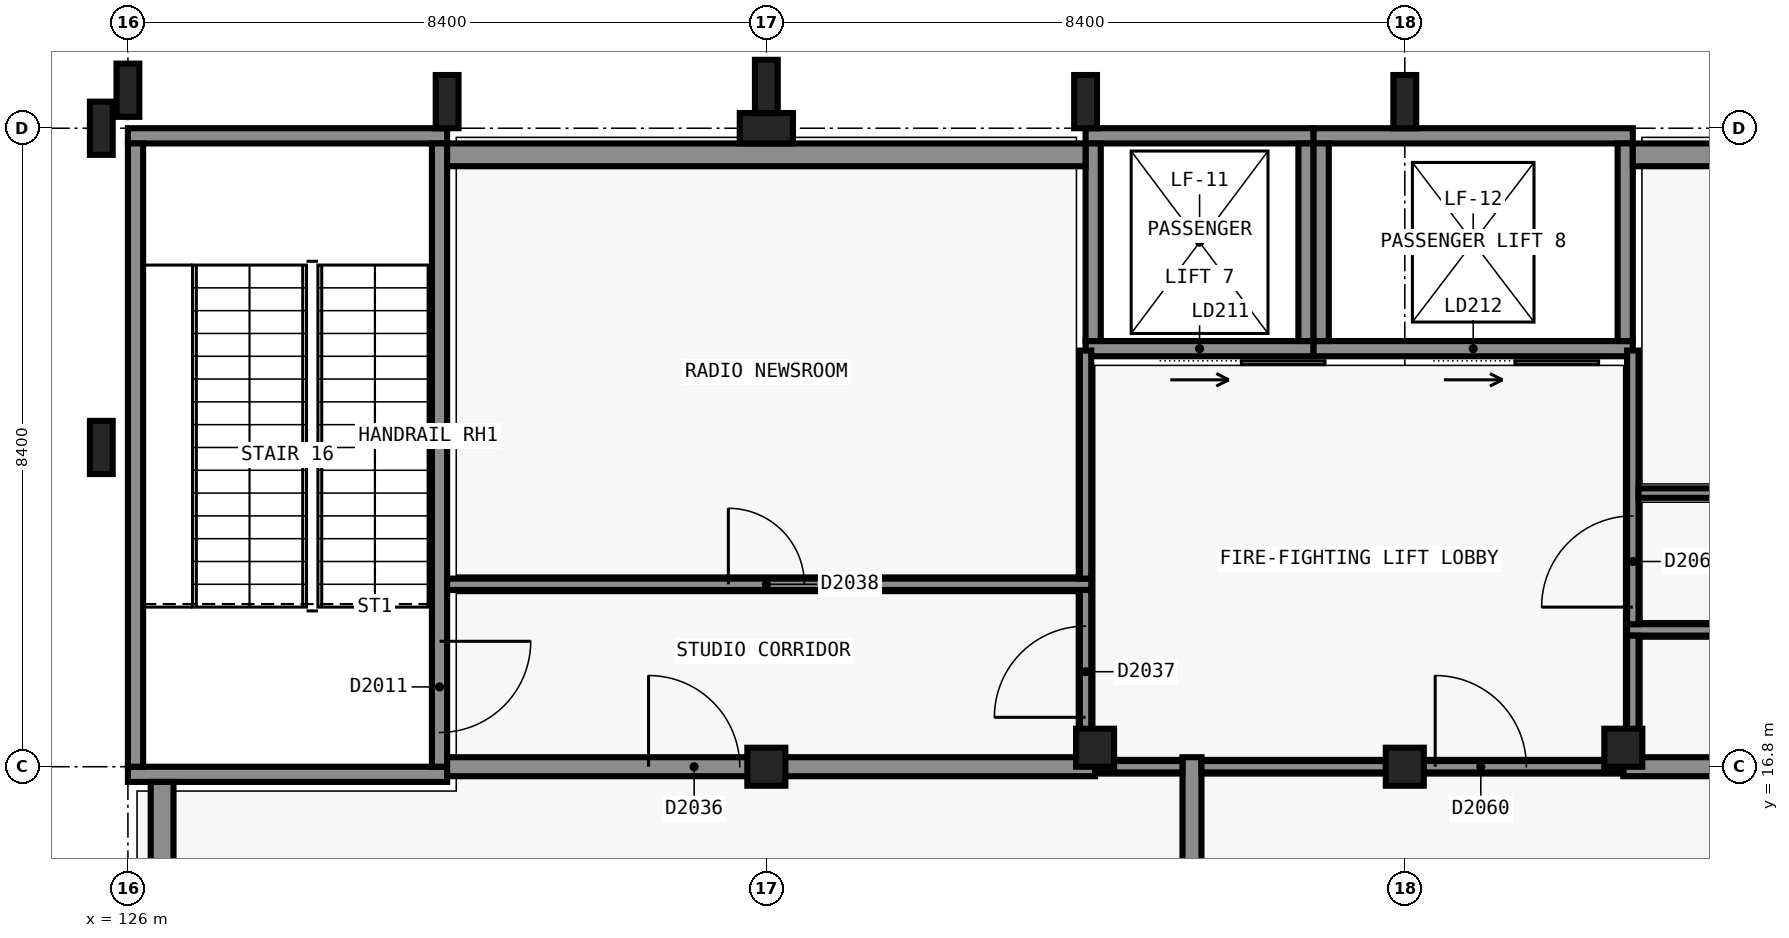
"""IFC4 building model, lengths in metres.
Left out: names, types, materials, properties, quantities, classifications, styles, units other than length and angle.
Written with IfcOpenShell. Run it as: python <this file> out.ifc"""

import sys

from ifc_helpers import new_model, si_unit, direction, frame, frame_2d, origin, origin_2d, place, context, subcontext, project, spatial, rectangle, extrude, element, fill, save


model = new_model("IFC4")
c1 = context("Model", 3, precision=1e-05, world=origin(), true_north=direction((0.0, 1.0)))
c2 = subcontext(c1, "Body", "Model", "MODEL_VIEW")
j1 = project(units=[si_unit("LENGTHUNIT", "METRE"), si_unit("PLANEANGLEUNIT", "RADIAN")], contexts=[c1])
p1 = place(None, origin())
s1 = spatial("IfcSite", under=j1, at=p1, CompositionType="ELEMENT")
p2 = place(p1, origin())
s2 = spatial("IfcBuilding", under=s1, at=p2, CompositionType="ELEMENT")
p3 = place(p2, frame((0.0, 0.0, 10.2)))
s3 = spatial("IfcBuildingStorey", under=s2, at=p3, CompositionType="ELEMENT", Elevation=10.2)
for number, where, z_axis, x_axis in (
    (1, (130.2, 16.7, 0.0), (0.0, 0.0, 1.0), (-1.0, 0.0, 0.0)),
    (2, (126.0, 25.1, 0.0), (0.0, 0.0, 1.0), (1.0, 0.0, 0.0)),
):
    element("IfcWall", number, at=place(p3, frame(where, z_axis=z_axis, x_axis=x_axis)), inside=s3, PredefinedType="SHEAR", context=c2, shape_type="SweptSolid", body=[
        extrude(rectangle(XDim=4.2, YDim=0.2, at=frame_2d((2.1, 0.0))), origin(), (0.0, 0.0, 1.0), 4.8),
    ])
p4 = place(p3, frame((126.1, 16.8, 0.0), z_axis=(0.0, 0.0, 1.0), x_axis=(0.0, 1.0, 0.0)))
e3 = element("IfcWall", 3, at=p4, inside=s3, PredefinedType="SHEAR", context=c2, shape_type="SweptSolid", body=[
    extrude(rectangle(XDim=8.2, YDim=0.2, at=frame_2d((4.1, 0.0))), origin(), (0.0, 0.0, 1.0), 4.8),
])
p5 = place(p3, frame((130.1, 25.0, 0.0), z_axis=(0.0, 0.0, 1.0), x_axis=(0.0, -1.0, 0.0)))
e4 = element("IfcWall", 4, at=p5, inside=s3, PredefinedType="SHEAR", context=c2, shape_type="SweptSolid", body=[
    extrude(rectangle(XDim=8.2, YDim=0.2, at=frame_2d((4.1, 0.0))), origin(), (0.0, 0.0, 1.0), 4.8),
])
p6 = place(p5, frame((6.55, 0.0, 0.0)))
e5 = element("IfcOpeningElement", 5, at=p6, cuts=e4, PredefinedType="OPENING", context=c2, shape_type="SweptSolid", body=[
    extrude(rectangle(XDim=1.2, YDim=2.1, at=frame_2d((0.6, 1.05))), frame((0.0, 0.11, 0.0), z_axis=(0.0, -1.0, 0.0), x_axis=(1.0, 0.0, 0.0)), (0.0, 0.0, 1.0), 0.22),
])
p7 = place(p3, frame((141.6, 22.3, 0.0), z_axis=(0.0, 0.0, 1.0), x_axis=(-1.0, 0.0, 0.0)))
e6 = element("IfcWall", 6, at=p7, inside=s3, PredefinedType="SHEAR", context=c2, shape_type="SweptSolid", body=[
    extrude(rectangle(XDim=3.0, YDim=0.2, at=frame_2d((1.5, 0.0))), origin(), (0.0, 0.0, 1.0), 4.8),
])
p8 = place(p7, frame((0.95, 0.0, 0.0)))
e7 = element("IfcOpeningElement", 7, at=p8, cuts=e6, PredefinedType="OPENING", context=c2, shape_type="SweptSolid", body=[
    extrude(rectangle(XDim=1.1, YDim=2.1, at=frame_2d((0.55, 1.05))), frame((0.0, 0.11, 0.0), z_axis=(0.0, -1.0, 0.0), x_axis=(1.0, 0.0, 0.0)), (0.0, 0.0, 1.0), 0.22),
])
p9 = place(p3, frame((138.6, 25.1, 0.0), z_axis=(0.0, 0.0, 1.0), x_axis=(1.0, 0.0, 0.0)))
e8 = element("IfcWall", 8, at=p9, inside=s3, PredefinedType="SHEAR", context=c2, shape_type="SweptSolid", body=[
    extrude(rectangle(XDim=3.0, YDim=0.2, at=frame_2d((1.5, 0.0))), origin(), (0.0, 0.0, 1.0), 4.8),
])
for number, where, z_axis, x_axis in (
    (9, (138.7, 22.4, 0.0), (0.0, 0.0, 1.0), (0.0, 1.0, 0.0)),
    (10, (141.5, 25.0, 0.0), (0.0, 0.0, 1.0), (0.0, -1.0, 0.0)),
):
    element("IfcWall", number, at=place(p3, frame(where, z_axis=z_axis, x_axis=x_axis)), inside=s3, PredefinedType="SHEAR", context=c2, shape_type="SweptSolid", body=[
        extrude(rectangle(XDim=2.6, YDim=0.2, at=frame_2d((1.3, 0.0))), origin(), (0.0, 0.0, 1.0), 4.8),
    ])
p10 = place(p3, frame((145.8, 22.3, 0.0), z_axis=(0.0, 0.0, 1.0), x_axis=(-1.0, 0.0, 0.0)))
e11 = element("IfcWall", 11, at=p10, inside=s3, PredefinedType="SHEAR", context=c2, shape_type="SweptSolid", body=[
    extrude(rectangle(XDim=4.2, YDim=0.2, at=frame_2d((2.1, 0.0))), origin(), (0.0, 0.0, 1.0), 4.8),
])
p11 = place(p10, frame((1.55, 0.0, 0.0)))
e12 = element("IfcOpeningElement", 12, at=p11, cuts=e11, PredefinedType="OPENING", context=c2, shape_type="SweptSolid", body=[
    extrude(rectangle(XDim=1.1, YDim=2.1, at=frame_2d((0.55, 1.05))), frame((0.0, 0.11, 0.0), z_axis=(0.0, -1.0, 0.0), x_axis=(1.0, 0.0, 0.0)), (0.0, 0.0, 1.0), 0.22),
])
p12 = place(p3, frame((141.6, 25.1, 0.0), z_axis=(0.0, 0.0, 1.0), x_axis=(1.0, 0.0, 0.0)))
e13 = element("IfcWall", 13, at=p12, inside=s3, PredefinedType="SHEAR", context=c2, shape_type="SweptSolid", body=[
    extrude(rectangle(XDim=4.2, YDim=0.2, at=frame_2d((2.1, 0.0))), origin(), (0.0, 0.0, 1.0), 4.8),
])
for number, where, z_axis, x_axis in (
    (14, (141.7, 22.4, 0.0), (0.0, 0.0, 1.0), (0.0, 1.0, 0.0)),
    (15, (145.7, 25.0, 0.0), (0.0, 0.0, 1.0), (0.0, -1.0, 0.0)),
):
    element("IfcWall", number, at=place(p3, frame(where, z_axis=z_axis, x_axis=x_axis)), inside=s3, PredefinedType="SHEAR", context=c2, shape_type="SweptSolid", body=[
        extrude(rectangle(XDim=2.6, YDim=0.2, at=frame_2d((1.3, 0.0))), origin(), (0.0, 0.0, 1.0), 4.8),
    ])
p13 = place(p3, frame((134.4, 16.8, 0.0), z_axis=(0.0, 0.0, 1.0), x_axis=(1.0, 0.0, 0.0)))
e16 = element("IfcColumn", 16, at=p13, inside=s3, PredefinedType="COLUMN", context=c2, shape_type="SweptSolid", body=[
    extrude(rectangle(XDim=0.5, YDim=0.5, at=origin_2d()), origin(), (0.0, 0.0, 1.0), 4.8),
])
p14 = place(p3, frame((134.4, 25.2, 0.0), z_axis=(0.0, 0.0, 1.0), x_axis=(1.0, 0.0, 0.0)))
e17 = element("IfcColumn", 17, at=p14, inside=s3, PredefinedType="COLUMN", context=c2, shape_type="SweptSolid", body=[
    extrude(rectangle(XDim=0.7, YDim=0.4, at=origin_2d()), origin(), (0.0, 0.0, 1.0), 4.8),
])
for number, where, z_axis, x_axis in (
    (18, (142.8, 16.8, 0.0), (0.0, 0.0, 1.0), (1.0, 0.0, 0.0)),
    (19, (138.725, 17.05, 0.0), (0.0, 0.0, 1.0), (1.0, 0.0, 0.0)),
    (20, (145.675, 17.05, 0.0), (0.0, 0.0, 1.0), (1.0, 0.0, 0.0)),
):
    element("IfcColumn", number, at=place(p3, frame(where, z_axis=z_axis, x_axis=x_axis)), inside=s3, PredefinedType="COLUMN", context=c2, shape_type="SweptSolid", body=[
        extrude(rectangle(XDim=0.5, YDim=0.5, at=origin_2d()), origin(), (0.0, 0.0, 1.0), 4.8),
    ])
p15 = place(p3, frame((130.2, 24.85, 0.0), z_axis=(0.0, 0.0, 1.0), x_axis=(1.0, 0.0, 0.0)))
e21 = element("IfcWall", 21, at=p15, inside=s3, PredefinedType="SOLIDWALL", context=c2, shape_type="SweptSolid", body=[
    extrude(rectangle(XDim=8.4, YDim=0.3, at=frame_2d((4.2, 0.0))), origin(), (0.0, 0.0, 1.0), 4.5),
])
p16 = place(p3, frame((145.8, 24.85, 0.0), z_axis=(0.0, 0.0, 1.0), x_axis=(1.0, 0.0, 0.0)))
e22 = element("IfcWall", 22, at=p16, inside=s3, PredefinedType="SOLIDWALL", context=c2, shape_type="SweptSolid", body=[
    extrude(rectangle(XDim=18.0, YDim=0.3, at=frame_2d((9.0, 0.0))), origin(), (0.0, 0.0, 1.0), 4.5),
])
p17 = place(p16, frame((2.7, 0.0, 1.5)))
e23 = element("IfcOpeningElement", 23, at=p17, cuts=e22, PredefinedType="OPENING", context=c2, shape_type="SweptSolid", body=[
    extrude(rectangle(XDim=1.2, YDim=0.9, at=frame_2d((0.6, 0.45))), frame((0.0, 0.16, 0.0), z_axis=(0.0, -1.0, 0.0), x_axis=(1.0, 0.0, 0.0)), (0.0, 0.0, 1.0), 0.32),
])
p18 = place(p16, frame((6.9, 0.0, 1.5)))
e24 = element("IfcOpeningElement", 24, at=p18, cuts=e22, PredefinedType="OPENING", context=c2, shape_type="SweptSolid", body=[
    extrude(rectangle(XDim=1.2, YDim=0.9, at=frame_2d((0.6, 0.45))), frame((0.0, 0.16, 0.0), z_axis=(0.0, -1.0, 0.0), x_axis=(1.0, 0.0, 0.0)), (0.0, 0.0, 1.0), 0.32),
])
for number, where, z_axis, x_axis in (
    (25, (126.0, 25.7, 0.0), (0.0, 0.0, 1.0), (1.0, 0.0, 0.0)),
    (26, (130.2, 25.55, 0.0), (0.0, 0.0, 1.0), (1.0, 0.0, 0.0)),
    (27, (134.4, 25.75, 0.0), (0.0, 0.0, 1.0), (1.0, 0.0, 0.0)),
    (28, (138.6, 25.55, 0.0), (0.0, 0.0, 1.0), (1.0, 0.0, 0.0)),
    (29, (142.8, 25.55, 0.0), (0.0, 0.0, 1.0), (1.0, 0.0, 0.0)),
):
    element("IfcColumn", number, at=place(p3, frame(where, z_axis=z_axis, x_axis=x_axis)), inside=s3, PredefinedType="PILASTER", context=c2, shape_type="SweptSolid", body=[
        extrude(rectangle(XDim=0.3, YDim=0.7, at=origin_2d()), origin(), (0.0, 0.0, 1.0), 4.8),
    ])
p19 = place(p3, frame((126.45, 12.8, 0.0), z_axis=(0.0, 0.0, 1.0), x_axis=(0.0, 1.0, 0.0)))
e30 = element("IfcWall", 30, at=p19, inside=s3, PredefinedType="SOLIDWALL", context=c2, shape_type="SweptSolid", body=[
    extrude(rectangle(XDim=3.8, YDim=0.3, at=frame_2d((1.9, 0.0))), origin(), (0.0, 0.0, 1.0), 4.5),
])
for number, where, z_axis, x_axis in (
    (31, (125.65, 21.0, 0.0), (0.0, 0.0, 1.0), (0.0, 1.0, 0.0)),
    (32, (125.65, 25.2, 0.0), (0.0, 0.0, 1.0), (0.0, 1.0, 0.0)),
):
    element("IfcColumn", number, at=place(p3, frame(where, z_axis=z_axis, x_axis=x_axis)), inside=s3, PredefinedType="PILASTER", context=c2, shape_type="SweptSolid", body=[
        extrude(rectangle(XDim=0.3, YDim=0.7, at=origin_2d()), origin(), (0.0, 0.0, 1.0), 4.8),
    ])
p20 = place(p3, frame((130.2, 16.8, 0.0), z_axis=(0.0, 0.0, 1.0), x_axis=(1.0, 0.0, 0.0)))
e33 = element("IfcWall", 33, at=p20, inside=s3, PredefinedType="PARTITIONING", context=c2, shape_type="SweptSolid", body=[
    extrude(rectangle(XDim=8.525, YDim=0.25, at=frame_2d((4.263, 0.0))), origin(), (0.0, 0.0, 1.0), 3.8),
])
p21 = place(p20, frame((2.65, 0.0, 0.0)))
e34 = element("IfcOpeningElement", 34, at=p21, cuts=e33, PredefinedType="OPENING", context=c2, shape_type="SweptSolid", body=[
    extrude(rectangle(XDim=1.2, YDim=2.1, at=frame_2d((0.6, 1.05))), frame((0.0, 0.135, 0.0), z_axis=(0.0, -1.0, 0.0), x_axis=(1.0, 0.0, 0.0)), (0.0, 0.0, 1.0), 0.27),
])
p22 = place(p3, frame((145.675, 16.8, 0.0), z_axis=(0.0, 0.0, 1.0), x_axis=(1.0, 0.0, 0.0)))
e35 = element("IfcWall", 35, at=p22, inside=s3, PredefinedType="PARTITIONING", context=c2, shape_type="SweptSolid", body=[
    extrude(rectangle(XDim=18.125, YDim=0.25, at=frame_2d((9.062, 0.0))), origin(), (0.0, 0.0, 1.0), 3.8),
])
p23 = place(p22, frame((12.325, 0.0, 0.0)))
e36 = element("IfcOpeningElement", 36, at=p23, cuts=e35, PredefinedType="OPENING", context=c2, shape_type="SweptSolid", body=[
    extrude(rectangle(XDim=1.2, YDim=2.1, at=frame_2d((0.6, 1.05))), frame((0.0, 0.135, 0.0), z_axis=(0.0, -1.0, 0.0), x_axis=(1.0, 0.0, 0.0)), (0.0, 0.0, 1.0), 0.27),
])
p24 = place(p3, frame((140.0, 12.8, 0.0), z_axis=(0.0, 0.0, 1.0), x_axis=(0.0, 1.0, 0.0)))
e37 = element("IfcWall", 37, at=p24, inside=s3, PredefinedType="PARTITIONING", context=c2, shape_type="SweptSolid", body=[
    extrude(rectangle(XDim=4.125, YDim=0.25, at=frame_2d((2.062, 0.0))), origin(), (0.0, 0.0, 1.0), 3.8),
])
p25 = place(p3, frame((145.725, 18.6, 0.0), z_axis=(0.0, 0.0, 1.0), x_axis=(1.0, 0.0, 0.0)))
e38 = element("IfcWall", 38, at=p25, inside=s3, PredefinedType="PARTITIONING", context=c2, shape_type="SweptSolid", body=[
    extrude(rectangle(XDim=1.95, YDim=0.15, at=frame_2d((0.975, 0.0))), origin(), (0.0, 0.0, 1.0), 4.5),
])
p26 = place(p3, frame((130.2, 19.2, 0.0), z_axis=(0.0, 0.0, 1.0), x_axis=(1.0, 0.0, 0.0)))
e39 = element("IfcWall", 39, at=p26, inside=s3, PredefinedType="PARTITIONING", context=c2, shape_type="SweptSolid", body=[
    extrude(rectangle(XDim=8.475, YDim=0.15, at=frame_2d((4.237, 0.0))), origin(), (0.0, 0.0, 1.0), 3.8),
])
p27 = place(p26, frame((3.7, 0.0, 0.0)))
e40 = element("IfcOpeningElement", 40, at=p27, cuts=e39, PredefinedType="OPENING", context=c2, shape_type="SweptSolid", body=[
    extrude(rectangle(XDim=1.0, YDim=2.1, at=frame_2d((0.5, 1.05))), frame((0.0, 0.085, 0.0), z_axis=(0.0, -1.0, 0.0), x_axis=(1.0, 0.0, 0.0)), (0.0, 0.0, 1.0), 0.17),
])
p28 = place(p3, frame((138.725, 16.8, 0.0), z_axis=(0.0, 0.0, 1.0), x_axis=(1.0, 0.0, 0.0)))
e41 = element("IfcWall", 41, at=p28, inside=s3, PredefinedType="SOLIDWALL", context=c2, shape_type="SweptSolid", body=[
    extrude(rectangle(XDim=1.15, YDim=0.15, at=frame_2d((0.575, 0.0))), origin(), (0.0, 0.0, 1.0), 3.8),
])
p29 = place(p3, frame((140.125, 16.8, 0.0), z_axis=(0.0, 0.0, 1.0), x_axis=(1.0, 0.0, 0.0)))
e42 = element("IfcWall", 42, at=p29, inside=s3, PredefinedType="SOLIDWALL", context=c2, shape_type="SweptSolid", body=[
    extrude(rectangle(XDim=5.55, YDim=0.15, at=frame_2d((2.775, 0.0))), origin(), (0.0, 0.0, 1.0), 3.8),
])
p30 = place(p29, frame((3.075, 0.0, 0.0)))
e43 = element("IfcOpeningElement", 43, at=p30, cuts=e42, PredefinedType="OPENING", context=c2, shape_type="SweptSolid", body=[
    extrude(rectangle(XDim=1.2, YDim=2.1, at=frame_2d((0.6, 1.05))), frame((0.0, 0.085, 0.0), z_axis=(0.0, -1.0, 0.0), x_axis=(1.0, 0.0, 0.0)), (0.0, 0.0, 1.0), 0.17),
])
p31 = place(p3, frame((138.6, 16.925, 0.0), z_axis=(0.0, 0.0, 1.0), x_axis=(0.0, 1.0, 0.0)))
e44 = element("IfcWall", 44, at=p31, inside=s3, PredefinedType="SOLIDWALL", context=c2, shape_type="SweptSolid", body=[
    extrude(rectangle(XDim=2.2, YDim=0.15, at=frame_2d((1.1, 0.0))), origin(), (0.0, 0.0, 1.0), 3.8),
])
p32 = place(p31, frame((0.525, 0.0, 0.0)))
e45 = element("IfcOpeningElement", 45, at=p32, cuts=e44, PredefinedType="OPENING", context=c2, shape_type="SweptSolid", body=[
    extrude(rectangle(XDim=1.2, YDim=2.1, at=frame_2d((0.6, 1.05))), frame((0.0, 0.085, 0.0), z_axis=(0.0, -1.0, 0.0), x_axis=(1.0, 0.0, 0.0)), (0.0, 0.0, 1.0), 0.17),
])
p33 = place(p3, frame((138.6, 19.275, 0.0), z_axis=(0.0, 0.0, 1.0), x_axis=(0.0, 1.0, 0.0)))
e46 = element("IfcWall", 46, at=p33, inside=s3, PredefinedType="SOLIDWALL", context=c2, shape_type="SweptSolid", body=[
    extrude(rectangle(XDim=3.0, YDim=0.15, at=frame_2d((1.5, 0.0))), origin(), (0.0, 0.0, 1.0), 4.5),
])
p34 = place(p3, frame((145.8, 16.925, 0.0), z_axis=(0.0, 0.0, 1.0), x_axis=(0.0, 1.0, 0.0)))
e47 = element("IfcWall", 47, at=p34, inside=s3, PredefinedType="SOLIDWALL", context=c2, shape_type="SweptSolid", body=[
    extrude(rectangle(XDim=1.6, YDim=0.15, at=frame_2d((0.8, 0.0))), origin(), (0.0, 0.0, 1.0), 3.8),
])
p35 = place(p3, frame((145.8, 18.675, 0.0), z_axis=(0.0, 0.0, 1.0), x_axis=(0.0, 1.0, 0.0)))
e48 = element("IfcWall", 48, at=p35, inside=s3, PredefinedType="SOLIDWALL", context=c2, shape_type="SweptSolid", body=[
    extrude(rectangle(XDim=3.6, YDim=0.15, at=frame_2d((1.8, 0.0))), origin(), (0.0, 0.0, 1.0), 4.5),
])
p36 = place(p35, frame((0.225, 0.0, 0.0)))
e49 = element("IfcOpeningElement", 49, at=p36, cuts=e48, PredefinedType="OPENING", context=c2, shape_type="SweptSolid", body=[
    extrude(rectangle(XDim=1.2, YDim=2.1, at=frame_2d((0.6, 1.05))), frame((0.0, 0.085, 0.0), z_axis=(0.0, -1.0, 0.0), x_axis=(1.0, 0.0, 0.0)), (0.0, 0.0, 1.0), 0.17),
])
p37 = place(p3, frame((145.875, 20.4, 0.0), z_axis=(0.0, 0.0, 1.0), x_axis=(1.0, 0.0, 0.0)))
e50 = element("IfcWall", 50, at=p37, inside=s3, PredefinedType="PARTITIONING", context=c2, shape_type="SweptSolid", body=[
    extrude(rectangle(XDim=1.788, YDim=0.125, at=frame_2d((0.894, 0.0))), origin(), (0.0, 0.0, 1.0), 4.5),
])
p38 = place(p8, origin())
e51 = element("IfcDoor", 51, at=p38, inside=s3, OperationType="SLIDING_TO_LEFT", PredefinedType="DOOR", context=c2, shape_type="SweptSolid", body=[
    extrude(rectangle(XDim=1.1, YDim=2.1, at=frame_2d((0.55, 1.05))), frame((0.0, 0.025, 0.0), z_axis=(0.0, -1.0, 0.0), x_axis=(1.0, 0.0, 0.0)), (0.0, 0.0, 1.0), 0.05),
])
fill(e7, e51)
p39 = place(p11, origin())
e52 = element("IfcDoor", 52, at=p39, inside=s3, OperationType="SLIDING_TO_LEFT", PredefinedType="DOOR", context=c2, shape_type="SweptSolid", body=[
    extrude(rectangle(XDim=1.1, YDim=2.1, at=frame_2d((0.55, 1.05))), frame((0.0, 0.025, 0.0), z_axis=(0.0, -1.0, 0.0), x_axis=(1.0, 0.0, 0.0)), (0.0, 0.0, 1.0), 0.05),
])
fill(e12, e52)
p40 = place(p6, origin())
e53 = element("IfcDoor", 53, at=p40, inside=s3, OperationType="SINGLE_SWING_LEFT", PredefinedType="DOOR", context=c2, shape_type="SweptSolid", body=[
    extrude(rectangle(XDim=1.2, YDim=2.1, at=frame_2d((0.6, 1.05))), frame((0.0, 0.025, 0.0), z_axis=(0.0, -1.0, 0.0), x_axis=(1.0, 0.0, 0.0)), (0.0, 0.0, 1.0), 0.05),
])
fill(e5, e53)
p41 = place(p21, origin())
e54 = element("IfcDoor", 54, at=p41, inside=s3, OperationType="SINGLE_SWING_LEFT", PredefinedType="DOOR", context=c2, shape_type="SweptSolid", body=[
    extrude(rectangle(XDim=1.2, YDim=2.1, at=frame_2d((0.6, 1.05))), frame((0.0, 0.025, 0.0), z_axis=(0.0, -1.0, 0.0), x_axis=(1.0, 0.0, 0.0)), (0.0, 0.0, 1.0), 0.05),
])
fill(e34, e54)
p42 = place(p32, origin())
e55 = element("IfcDoor", 55, at=p42, inside=s3, OperationType="SINGLE_SWING_RIGHT", PredefinedType="DOOR", context=c2, shape_type="SweptSolid", body=[
    extrude(rectangle(XDim=1.2, YDim=2.1, at=frame_2d((0.6, 1.05))), frame((0.0, 0.025, 0.0), z_axis=(0.0, -1.0, 0.0), x_axis=(1.0, 0.0, 0.0)), (0.0, 0.0, 1.0), 0.05),
])
fill(e45, e55)
p43 = place(p27, origin())
e56 = element("IfcDoor", 56, at=p43, inside=s3, OperationType="SINGLE_SWING_LEFT", PredefinedType="DOOR", context=c2, shape_type="SweptSolid", body=[
    extrude(rectangle(XDim=1.0, YDim=2.1, at=frame_2d((0.5, 1.05))), frame((0.0, 0.025, 0.0), z_axis=(0.0, -1.0, 0.0), x_axis=(1.0, 0.0, 0.0)), (0.0, 0.0, 1.0), 0.05),
])
fill(e40, e56)
p44 = place(p30, origin())
e57 = element("IfcDoor", 57, at=p44, inside=s3, OperationType="SINGLE_SWING_RIGHT", PredefinedType="DOOR", context=c2, shape_type="SweptSolid", body=[
    extrude(rectangle(XDim=1.2, YDim=2.1, at=frame_2d((0.6, 1.05))), frame((0.0, 0.025, 0.0), z_axis=(0.0, -1.0, 0.0), x_axis=(1.0, 0.0, 0.0)), (0.0, 0.0, 1.0), 0.05),
])
fill(e43, e57)
p45 = place(p36, origin())
e58 = element("IfcDoor", 58, at=p45, inside=s3, OperationType="SINGLE_SWING_RIGHT", PredefinedType="DOOR", context=c2, shape_type="SweptSolid", body=[
    extrude(rectangle(XDim=1.2, YDim=2.1, at=frame_2d((0.6, 1.05))), frame((0.0, 0.025, 0.0), z_axis=(0.0, -1.0, 0.0), x_axis=(1.0, 0.0, 0.0)), (0.0, 0.0, 1.0), 0.05),
])
fill(e49, e58)
save(model, sys.argv[1])
